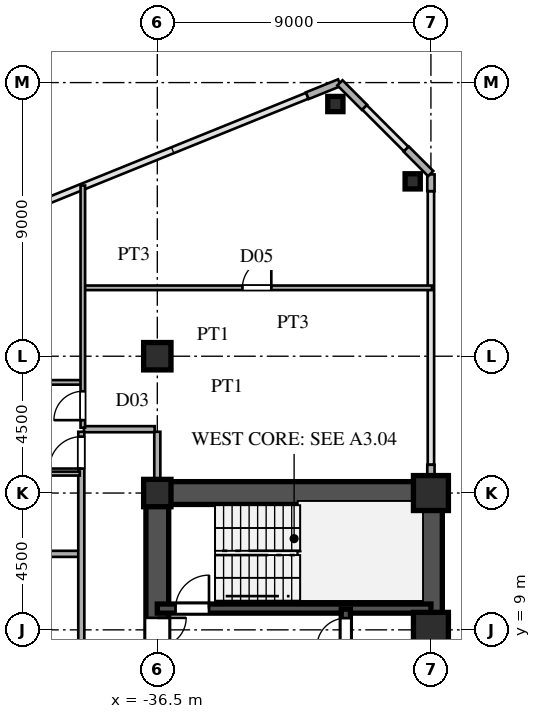
"""IFC4 building model, lengths in metres.
Left out: names, types, materials, properties, quantities, classifications, styles, units other than length and angle.
Written with IfcOpenShell. Run it as: python <this file> out.ifc"""

import sys

from ifc_helpers import new_model, si_unit, direction, frame, frame_2d, origin, origin_2d, place, context, subcontext, project, spatial, rectangle, hollow_rectangle, i_section, extrude, source, transform, mapped, element, fill, save


model = new_model("IFC4")
c1 = context("Model", 3, precision=1e-05, world=origin(), true_north=direction((0.0, 1.0)))
c2 = subcontext(c1, "Body", "Model", "MODEL_VIEW")
j1 = project(units=[si_unit("LENGTHUNIT", "METRE"), si_unit("PLANEANGLEUNIT", "RADIAN")], contexts=[c1])
p1 = place(None, origin())
s1 = spatial("IfcSite", under=j1, at=p1, CompositionType="ELEMENT")
p2 = place(p1, origin())
s2 = spatial("IfcBuilding", under=s1, at=p2, CompositionType="ELEMENT")
p3 = place(p2, frame((0.0, 0.0, 36.9)))
s3 = spatial("IfcBuildingStorey", under=s2, at=p3, CompositionType="ELEMENT", Elevation=36.9)
m1 = source(origin(), c2, "Body", "SweptSolid", [
    extrude(hollow_rectangle(XDim=1.15, YDim=1.15, WallThickness=0.048, at=origin_2d()), origin(), (0.0, 0.0, 1.0), 3.6),
])
for number, where, z_axis, x_axis in (
    (1, (-27.5, 9.0, 0.0), (0.0, 0.0, 1.0), (1.0, 0.0, 0.0)),
    (2, (-27.5, 13.5, 0.0), (0.0, 0.0, 1.0), (1.0, 0.0, 0.0)),
):
    element("IfcColumn", number, at=place(p3, frame(where, z_axis=z_axis, x_axis=x_axis)), inside=s3, PredefinedType="COLUMN", context=c2, shape_type="MappedRepresentation", body=[
        mapped(m1, transform((0.0, 0.0, 0.0), scale=1.0)),
    ])
m2 = source(origin(), c2, "Body", "SweptSolid", [
    extrude(i_section(OverallWidth=0.9, OverallDepth=0.9, WebThickness=0.036, FlangeThickness=0.055, at=origin_2d()), origin(), (0.0, 0.0, 1.0), 3.6),
])
for number, where, z_axis, x_axis in (
    (3, (-36.5, 13.5, 0.0), (0.0, 0.0, 1.0), (1.0, 0.0, 0.0)),
    (4, (-36.5, 18.0, 0.0), (0.0, 0.0, 1.0), (1.0, 0.0, 0.0)),
):
    element("IfcColumn", number, at=place(p3, frame(where, z_axis=z_axis, x_axis=x_axis)), inside=s3, PredefinedType="COLUMN", context=c2, shape_type="MappedRepresentation", body=[
        mapped(m2, transform((0.0, 0.0, 0.0), scale=1.0)),
    ])
m3 = source(origin(), c2, "Body", "SweptSolid", [
    extrude(hollow_rectangle(XDim=0.5, YDim=0.5, WallThickness=0.02, at=origin_2d()), origin(), (0.0, 0.0, 1.0), 3.6),
])
for number, where, z_axis, x_axis in (
    (5, (-28.1, 23.751, 0.0), (0.0, 0.0, 1.0), (1.0, 0.0, 0.0)),
    (6, (-30.643, 26.295, 0.0), (0.0, 0.0, 1.0), (1.0, 0.0, 0.0)),
):
    element("IfcColumn", number, at=place(p3, frame(where, z_axis=z_axis, x_axis=x_axis)), inside=s3, PredefinedType="COLUMN", context=c2, shape_type="MappedRepresentation", body=[
        mapped(m3, transform((0.0, 0.0, 0.0), scale=1.0)),
    ])
p4 = place(p3, frame((-27.5, 13.88, 0.0), z_axis=(0.0, 0.0, 1.0), x_axis=(0.0, 1.0, 0.0)))
e7 = element("IfcWall", 7, at=p4, inside=s3, PredefinedType="SOLIDWALL", context=c2, shape_type="SweptSolid", body=[
    extrude(rectangle(XDim=0.55, YDim=0.24, at=frame_2d((0.275, 0.0))), origin(), (0.0, 0.0, 1.0), 2.88),
])
p5 = place(p3, frame((-27.5, 23.43, 0.0), z_axis=(0.0, 0.0, 1.0), x_axis=(0.0, 1.0, 0.0)))
e8 = element("IfcWall", 8, at=p5, inside=s3, PredefinedType="SOLIDWALL", context=c2, shape_type="SweptSolid", body=[
    extrude(rectangle(XDim=0.55, YDim=0.24, at=frame_2d((0.275, 0.0))), origin(), (0.0, 0.0, 1.0), 3.38),
])
for number, where, z_axis, x_axis in (
    (9, (-27.507, 24.007, 0.0), (0.0, 0.0, 1.0), (-0.707, 0.707, 0.0)),
    (10, (-29.687, 26.187, 0.0), (0.0, 0.0, 1.0), (-0.707, 0.707, 0.0)),
):
    element("IfcWall", number, at=place(p3, frame(where, z_axis=z_axis, x_axis=x_axis)), inside=s3, PredefinedType="SOLIDWALL", context=c2, shape_type="SweptSolid", body=[
        extrude(rectangle(XDim=1.14, YDim=0.24, at=frame_2d((0.57, 0.0))), origin(), (0.0, 0.0, 1.0), 3.38),
    ])
p6 = place(p3, frame((-30.509, 26.996, 0.0), z_axis=(0.0, 0.0, 1.0), x_axis=(-0.927007103665, -0.375043770452, 0.0)))
e11 = element("IfcWall", 11, at=p6, inside=s3, PredefinedType="SOLIDWALL", context=c2, shape_type="SweptSolid", body=[
    extrude(rectangle(XDim=1.14, YDim=0.24, at=frame_2d((0.57, 0.0))), origin(), (0.0, 0.0, 1.0), 3.38),
])
p7 = place(p3, frame((-27.5, 1.3, 0.0), z_axis=(0.0, 0.0, 1.0), x_axis=(0.0, 1.0, 0.0)))
e12 = element("IfcWall", 12, at=p7, inside=s3, PredefinedType="SHEAR", context=c2, shape_type="SweptSolid", body=[
    extrude(rectangle(XDim=12.2, YDim=0.75, at=frame_2d((6.1, 0.0))), origin(), (0.0, 0.0, 1.0), 3.38),
])
p8 = place(p3, frame((-36.5, 13.5, 0.0), z_axis=(0.0, 0.0, 1.0), x_axis=(1.0, 0.0, 0.0)))
e13 = element("IfcWall", 13, at=p8, inside=s3, PredefinedType="SHEAR", context=c2, shape_type="SweptSolid", body=[
    extrude(rectangle(XDim=9.0, YDim=0.75, at=frame_2d((4.5, 0.0))), origin(), (0.0, 0.0, 1.0), 3.38),
])
p9 = place(p3, frame((-36.5, 8.2, 0.0), z_axis=(0.0, 0.0, 1.0), x_axis=(0.0, 1.0, 0.0)))
e14 = element("IfcWall", 14, at=p9, inside=s3, PredefinedType="SHEAR", context=c2, shape_type="SweptSolid", body=[
    extrude(rectangle(XDim=5.45, YDim=0.75, at=frame_2d((2.725, 0.0))), origin(), (0.0, 0.0, 1.0), 3.38),
])
p10 = place(p9, frame((0.245, 0.0, 0.0)))
e15 = element("IfcOpeningElement", 15, at=p10, cuts=e14, PredefinedType="OPENING", context=c2, shape_type="SweptSolid", body=[
    extrude(rectangle(XDim=0.95, YDim=2.15, at=frame_2d((0.475, 1.075))), frame((0.0, 0.385, 0.0), z_axis=(0.0, -1.0, 0.0), x_axis=(1.0, 0.0, 0.0)), (0.0, 0.0, 1.0), 0.77),
])
p11 = place(p3, frame((-36.5, 9.7, 0.0), z_axis=(0.0, 0.0, 1.0), x_axis=(1.0, 0.0, 0.0)))
e16 = element("IfcWall", 16, at=p11, inside=s3, PredefinedType="SHEAR", context=c2, shape_type="SweptSolid", body=[
    extrude(rectangle(XDim=9.0, YDim=0.3, at=frame_2d((4.5, 0.0))), origin(), (0.0, 0.0, 1.0), 3.38),
])
p12 = place(p11, frame((0.6, 0.0, 0.0)))
e17 = element("IfcOpeningElement", 17, at=p12, cuts=e16, PredefinedType="OPENING", context=c2, shape_type="SweptSolid", body=[
    extrude(rectangle(XDim=1.1, YDim=2.2, at=frame_2d((0.55, 1.1))), frame((0.0, 0.16, 0.0), z_axis=(0.0, -1.0, 0.0), x_axis=(1.0, 0.0, 0.0)), (0.0, 0.0, 1.0), 0.32),
])
p13 = place(p3, frame((-30.3, 8.15, 0.0), z_axis=(0.0, 0.0, 1.0), x_axis=(0.0, 1.0, 0.0)))
e18 = element("IfcWall", 18, at=p13, inside=s3, PredefinedType="SHEAR", context=c2, shape_type="SweptSolid", body=[
    extrude(rectangle(XDim=1.53, YDim=0.3, at=frame_2d((0.765, 0.0))), origin(), (0.0, 0.0, 1.0), 3.38),
])
p14 = place(p13, frame((0.285, 0.0, 0.0)))
e19 = element("IfcOpeningElement", 19, at=p14, cuts=e18, PredefinedType="OPENING", context=c2, shape_type="SweptSolid", body=[
    extrude(rectangle(XDim=0.95, YDim=2.15, at=frame_2d((0.475, 1.075))), frame((0.0, 0.16, 0.0), z_axis=(0.0, -1.0, 0.0), x_axis=(1.0, 0.0, 0.0)), (0.0, 0.0, 1.0), 0.32),
])
p15 = place(p3, frame((-68.807, 11.5, 0.0), z_axis=(0.0, 0.0, 1.0), x_axis=(1.0, 0.0, 0.0)))
e20 = element("IfcWall", 20, at=p15, inside=s3, PredefinedType="PARTITIONING", context=c2, shape_type="SweptSolid", body=[
    extrude(rectangle(XDim=29.727, YDim=0.2, at=frame_2d((14.863, 0.0))), origin(), (0.0, 0.0, 1.0), 3.38),
])
p16 = place(p3, frame((-44.55, 14.14, 0.0), z_axis=(0.0, 0.0, 1.0), x_axis=(1.0, 0.0, 0.0)))
e21 = element("IfcWall", 21, at=p16, inside=s3, PredefinedType="PARTITIONING", context=c2, shape_type="SweptSolid", body=[
    extrude(rectangle(XDim=5.5, YDim=0.13, at=frame_2d((2.75, 0.0))), origin(), (0.0, 0.0, 1.0), 3.38),
])
p17 = place(p16, frame((2.31, 0.0, 0.0)))
e22 = element("IfcOpeningElement", 22, at=p17, cuts=e21, PredefinedType="OPENING", context=c2, shape_type="SweptSolid", body=[
    extrude(rectangle(XDim=0.88, YDim=2.1, at=frame_2d((0.44, 1.05))), frame((0.0, 0.075, 0.0), z_axis=(0.0, -1.0, 0.0), x_axis=(1.0, 0.0, 0.0)), (0.0, 0.0, 1.0), 0.15),
])
p18 = place(p3, frame((-38.915, 15.6, 0.0), z_axis=(0.0, 0.0, 1.0), x_axis=(1.0, 0.0, 0.0)))
e23 = element("IfcWall", 23, at=p18, inside=s3, PredefinedType="PARTITIONING", context=c2, shape_type="SweptSolid", body=[
    extrude(rectangle(XDim=2.33, YDim=0.2, at=frame_2d((1.165, 0.0))), origin(), (0.0, 0.0, 1.0), 3.38),
])
p19 = place(p3, frame((-44.55, 17.14, 0.0), z_axis=(0.0, 0.0, 1.0), x_axis=(1.0, 0.0, 0.0)))
e24 = element("IfcWall", 24, at=p19, inside=s3, PredefinedType="PARTITIONING", context=c2, shape_type="SweptSolid", body=[
    extrude(rectangle(XDim=5.55, YDim=0.15, at=frame_2d((2.775, 0.0))), origin(), (0.0, 0.0, 1.0), 3.38),
])
p20 = place(p19, frame((2.3, 0.0, 0.0)))
e25 = element("IfcOpeningElement", 25, at=p20, cuts=e24, PredefinedType="OPENING", context=c2, shape_type="SweptSolid", body=[
    extrude(rectangle(XDim=0.95, YDim=2.15, at=frame_2d((0.475, 1.075))), frame((0.0, 0.085, 0.0), z_axis=(0.0, -1.0, 0.0), x_axis=(1.0, 0.0, 0.0)), (0.0, 0.0, 1.0), 0.17),
])
p21 = place(p3, frame((-38.9, 20.25, 0.0), z_axis=(0.0, 0.0, 1.0), x_axis=(1.0, 0.0, 0.0)))
e26 = element("IfcWall", 26, at=p21, inside=s3, PredefinedType="PARTITIONING", context=c2, shape_type="SweptSolid", body=[
    extrude(rectangle(XDim=11.435, YDim=0.15, at=frame_2d((5.717, 0.0))), origin(), (0.0, 0.0, 1.0), 3.38),
])
p22 = place(p21, frame((5.2, 0.0, 0.0)))
e27 = element("IfcOpeningElement", 27, at=p22, cuts=e26, PredefinedType="OPENING", context=c2, shape_type="SweptSolid", body=[
    extrude(rectangle(XDim=0.95, YDim=2.15, at=frame_2d((0.475, 1.075))), frame((0.0, 0.085, 0.0), z_axis=(0.0, -1.0, 0.0), x_axis=(1.0, 0.0, 0.0)), (0.0, 0.0, 1.0), 0.17),
])
p23 = place(p3, frame((-39.0, -15.515, 0.0), z_axis=(0.0, 0.0, 1.0), x_axis=(0.0, 1.0, 0.0)))
e28 = element("IfcWall", 28, at=p23, inside=s3, PredefinedType="PARTITIONING", context=c2, shape_type="SweptSolid", body=[
    extrude(rectangle(XDim=31.03, YDim=0.2, at=frame_2d((15.515, 0.0))), origin(), (0.0, 0.0, 1.0), 3.38),
])
p24 = place(p23, frame((0.367, 0.0, 0.0)))
e29 = element("IfcOpeningElement", 29, at=p24, cuts=e28, PredefinedType="OPENING", context=c2, shape_type="SweptSolid", body=[
    extrude(rectangle(XDim=1.05, YDim=2.25, at=frame_2d((0.525, 1.125))), frame((0.0, 0.11, 0.0), z_axis=(0.0, -1.0, 0.0), x_axis=(1.0, 0.0, 0.0)), (0.0, 0.0, 1.0), 0.22),
])
p25 = place(p23, frame((8.638, 0.0, 0.0)))
e30 = element("IfcOpeningElement", 30, at=p25, cuts=e28, PredefinedType="OPENING", context=c2, shape_type="SweptSolid", body=[
    extrude(rectangle(XDim=1.05, YDim=2.25, at=frame_2d((0.525, 1.125))), frame((0.0, 0.11, 0.0), z_axis=(0.0, -1.0, 0.0), x_axis=(1.0, 0.0, 0.0)), (0.0, 0.0, 1.0), 0.22),
])
p26 = place(p23, frame((19.795, 0.0, 0.0)))
e31 = element("IfcOpeningElement", 31, at=p26, cuts=e28, PredefinedType="OPENING", context=c2, shape_type="SweptSolid", body=[
    extrude(rectangle(XDim=1.05, YDim=2.25, at=frame_2d((0.525, 1.125))), frame((0.0, 0.11, 0.0), z_axis=(0.0, -1.0, 0.0), x_axis=(1.0, 0.0, 0.0)), (0.0, 0.0, 1.0), 0.22),
])
p27 = place(p23, frame((29.82, 0.0, 0.0)))
e32 = element("IfcOpeningElement", 32, at=p27, cuts=e28, PredefinedType="OPENING", context=c2, shape_type="SweptSolid", body=[
    extrude(rectangle(XDim=1.05, YDim=2.25, at=frame_2d((0.525, 1.125))), frame((0.0, 0.11, 0.0), z_axis=(0.0, -1.0, 0.0), x_axis=(1.0, 0.0, 0.0)), (0.0, 0.0, 1.0), 0.22),
])
p28 = place(p3, frame((-38.95, 15.65, 0.0), z_axis=(0.0, 0.0, 1.0), x_axis=(0.0, 1.0, 0.0)))
e33 = element("IfcWall", 33, at=p28, inside=s3, PredefinedType="PARTITIONING", context=c2, shape_type="SweptSolid", body=[
    extrude(rectangle(XDim=7.965, YDim=0.15, at=frame_2d((3.982, 0.0))), origin(), (0.0, 0.0, 1.0), 3.38),
])
p29 = place(p28, frame((0.248, 0.0, 0.0)))
e34 = element("IfcOpeningElement", 34, at=p29, cuts=e33, PredefinedType="OPENING", context=c2, shape_type="SweptSolid", body=[
    extrude(rectangle(XDim=0.95, YDim=2.15, at=frame_2d((0.475, 1.075))), frame((0.0, 0.085, 0.0), z_axis=(0.0, -1.0, 0.0), x_axis=(1.0, 0.0, 0.0)), (0.0, 0.0, 1.0), 0.17),
])
p30 = place(p3, frame((-36.5, 13.88, 0.0), z_axis=(0.0, 0.0, 1.0), x_axis=(0.0, 1.0, 0.0)))
e35 = element("IfcWall", 35, at=p30, inside=s3, PredefinedType="PARTITIONING", context=c2, shape_type="SweptSolid", body=[
    extrude(rectangle(XDim=1.635, YDim=0.2, at=frame_2d((0.817, 0.0))), origin(), (0.0, 0.0, 1.0), 2.68),
])
m4 = source(origin(), c2, "Body", "SweptSolid", [
    extrude(rectangle(XDim=0.95, YDim=2.15, at=frame_2d((0.475, 1.075))), frame((0.0, 0.025, 0.0), z_axis=(0.0, -1.0, 0.0), x_axis=(1.0, 0.0, 0.0)), (0.0, 0.0, 1.0), 0.05),
])
p31 = place(p10, frame((0.95, 0.0, 0.0), z_axis=(0.0, 0.0, 1.0), x_axis=(-1.0, 0.0, 0.0)))
e36 = element("IfcDoor", 36, at=p31, inside=s3, OperationType="SINGLE_SWING_RIGHT", PredefinedType="DOOR", context=c2, shape_type="MappedRepresentation", body=[
    mapped(m4, transform((0.0, 0.0, 0.0), scale=1.0)),
])
fill(e15, e36)
m5 = source(origin(), c2, "Body", "SweptSolid", [
    extrude(rectangle(XDim=1.1, YDim=2.2, at=frame_2d((0.55, 1.1))), frame((0.0, 0.025, 0.0), z_axis=(0.0, -1.0, 0.0), x_axis=(1.0, 0.0, 0.0)), (0.0, 0.0, 1.0), 0.05),
])
p32 = place(p12, origin())
e37 = element("IfcDoor", 37, at=p32, inside=s3, OperationType="SINGLE_SWING_RIGHT", PredefinedType="DOOR", context=c2, shape_type="MappedRepresentation", body=[
    mapped(m5, transform((0.0, 0.0, 0.0), scale=1.0)),
])
fill(e17, e37)
p33 = place(p14, origin())
e38 = element("IfcDoor", 38, at=p33, inside=s3, OperationType="SINGLE_SWING_LEFT", PredefinedType="DOOR", context=c2, shape_type="MappedRepresentation", body=[
    mapped(m4, transform((0.0, 0.0, 0.0), scale=1.0)),
])
fill(e19, e38)
m6 = source(origin(), c2, "Body", "SweptSolid", [
    extrude(rectangle(XDim=0.95, YDim=2.15, at=frame_2d((0.475, 1.075))), frame((0.0, 0.025, 0.0), z_axis=(0.0, -1.0, 0.0), x_axis=(1.0, 0.0, 0.0)), (0.0, 0.0, 1.0), 0.05),
])
p34 = place(p22, origin())
e39 = element("IfcDoor", 39, at=p34, inside=s3, OperationType="SINGLE_SWING_RIGHT", PredefinedType="DOOR", context=c2, shape_type="MappedRepresentation", body=[
    mapped(m6, transform((0.0, 0.0, 0.0), scale=1.0)),
])
fill(e27, e39)
m7 = source(origin(), c2, "Body", "SweptSolid", [
    extrude(rectangle(XDim=1.05, YDim=2.25, at=frame_2d((0.525, 1.125))), frame((0.0, 0.025, 0.0), z_axis=(0.0, -1.0, 0.0), x_axis=(1.0, 0.0, 0.0)), (0.0, 0.0, 1.0), 0.05),
])
p35 = place(p27, origin())
e40 = element("IfcDoor", 40, at=p35, inside=s3, OperationType="SINGLE_SWING_LEFT", PredefinedType="DOOR", context=c2, shape_type="MappedRepresentation", body=[
    mapped(m7, transform((0.0, 0.0, 0.0), scale=1.0)),
])
fill(e32, e40)
p36 = place(p29, origin())
e41 = element("IfcDoor", 41, at=p36, inside=s3, OperationType="SINGLE_SWING_LEFT", PredefinedType="DOOR", context=c2, shape_type="MappedRepresentation", body=[
    mapped(m6, transform((0.0, 0.0, 0.0), scale=1.0)),
])
fill(e34, e41)
save(model, sys.argv[1])
